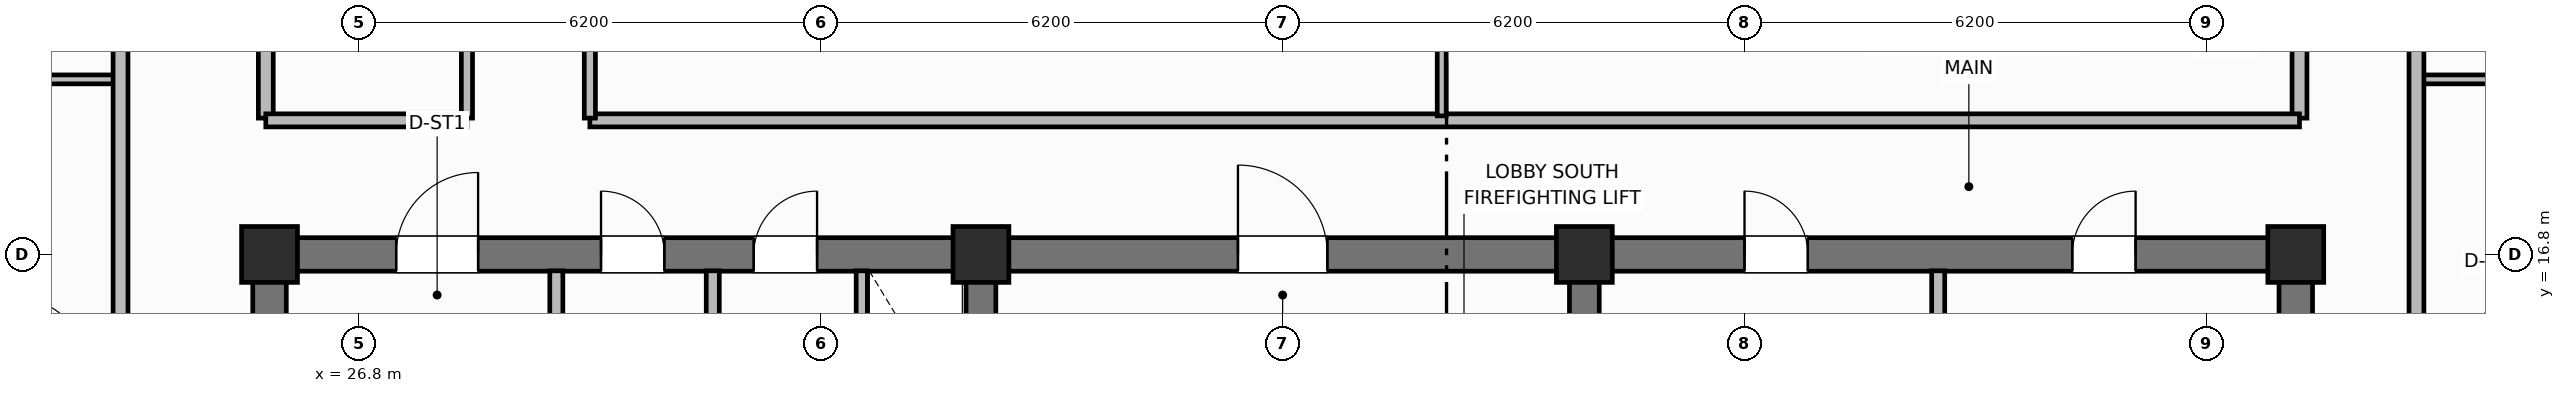
"""IFC4 building model, lengths in metres.
Left out: names, types, materials, properties, quantities, classifications, styles, units other than length and angle.
Written with IfcOpenShell. Run it as: python <this file> out.ifc"""

import sys

from ifc_helpers import new_model, si_unit, direction, frame, frame_2d, origin, origin_2d, place, context, subcontext, project, spatial, rectangle, extrude, element, fill, save


model = new_model("IFC4")
c1 = context("Model", 3, precision=1e-05, world=origin(), true_north=direction((0.0, 1.0)))
c2 = subcontext(c1, "Body", "Model", "MODEL_VIEW")
j1 = project(units=[si_unit("LENGTHUNIT", "METRE"), si_unit("PLANEANGLEUNIT", "RADIAN")], contexts=[c1])
p1 = place(None, origin())
s1 = spatial("IfcSite", under=j1, at=p1, CompositionType="ELEMENT")
p2 = place(p1, origin())
s2 = spatial("IfcBuilding", under=s1, at=p2, CompositionType="ELEMENT")
p3 = place(p2, frame((0.0, 0.0, 293.5)))
s3 = spatial("IfcBuildingStorey", under=s2, at=p3, CompositionType="ELEMENT", Elevation=293.5)
for number, where, z_axis, x_axis in (
    (1, (25.6, 10.825, 0.0), (0.0, 0.0, 1.0), (0.0, 1.0, 0.0)),
    (2, (52.8, 10.825, 0.0), (0.0, 0.0, 1.0), (0.0, 1.0, 0.0)),
):
    element("IfcWall", number, at=place(p3, frame(where, z_axis=z_axis, x_axis=x_axis)), inside=s3, PredefinedType="SHEAR", context=c2, shape_type="SweptSolid", body=[
        extrude(rectangle(XDim=5.75, YDim=0.45, at=frame_2d((2.875, 0.0))), origin(), (0.0, 0.0, 1.0), 3.7),
    ])
p4 = place(p3, frame((25.6, 16.8, 0.0), z_axis=(0.0, 0.0, 1.0), x_axis=(1.0, 0.0, 0.0)))
e3 = element("IfcWall", 3, at=p4, inside=s3, PredefinedType="SHEAR", context=c2, shape_type="SweptSolid", body=[
    extrude(rectangle(XDim=27.2, YDim=0.45, at=frame_2d((13.6, 0.0))), origin(), (0.0, 0.0, 1.0), 3.7),
])
p5 = place(p4, frame((1.7, 0.0, 0.0)))
e4 = element("IfcOpeningElement", 4, at=p5, cuts=e3, PredefinedType="OPENING", context=c2, shape_type="SweptSolid", body=[
    extrude(rectangle(XDim=1.1, YDim=2.15, at=frame_2d((0.55, 1.075))), frame((0.0, 0.235, 0.0), z_axis=(0.0, -1.0, 0.0), x_axis=(1.0, 0.0, 0.0)), (0.0, 0.0, 1.0), 0.47),
])
p6 = place(p4, frame((4.45, 0.0, 0.0)))
e5 = element("IfcOpeningElement", 5, at=p6, cuts=e3, PredefinedType="OPENING", context=c2, shape_type="SweptSolid", body=[
    extrude(rectangle(XDim=0.85, YDim=2.1, at=frame_2d((0.425, 1.05))), frame((0.0, 0.235, 0.0), z_axis=(0.0, -1.0, 0.0), x_axis=(1.0, 0.0, 0.0)), (0.0, 0.0, 1.0), 0.47),
])
p7 = place(p4, frame((6.5, 0.0, 0.0)))
e6 = element("IfcOpeningElement", 6, at=p7, cuts=e3, PredefinedType="OPENING", context=c2, shape_type="SweptSolid", body=[
    extrude(rectangle(XDim=0.85, YDim=2.1, at=frame_2d((0.425, 1.05))), frame((0.0, 0.235, 0.0), z_axis=(0.0, -1.0, 0.0), x_axis=(1.0, 0.0, 0.0)), (0.0, 0.0, 1.0), 0.47),
])
p8 = place(p4, frame((13.0, 0.0, 0.0)))
e7 = element("IfcOpeningElement", 7, at=p8, cuts=e3, PredefinedType="OPENING", context=c2, shape_type="SweptSolid", body=[
    extrude(rectangle(XDim=1.2, YDim=2.15, at=frame_2d((0.6, 1.075))), frame((0.0, 0.235, 0.0), z_axis=(0.0, -1.0, 0.0), x_axis=(1.0, 0.0, 0.0)), (0.0, 0.0, 1.0), 0.47),
])
p9 = place(p4, frame((19.8, 0.0, 0.0)))
e8 = element("IfcOpeningElement", 8, at=p9, cuts=e3, PredefinedType="OPENING", context=c2, shape_type="SweptSolid", body=[
    extrude(rectangle(XDim=0.85, YDim=2.1, at=frame_2d((0.425, 1.05))), frame((0.0, 0.235, 0.0), z_axis=(0.0, -1.0, 0.0), x_axis=(1.0, 0.0, 0.0)), (0.0, 0.0, 1.0), 0.47),
])
p10 = place(p4, frame((24.2, 0.0, 0.0)))
e9 = element("IfcOpeningElement", 9, at=p10, cuts=e3, PredefinedType="OPENING", context=c2, shape_type="SweptSolid", body=[
    extrude(rectangle(XDim=0.85, YDim=2.1, at=frame_2d((0.425, 1.05))), frame((0.0, 0.235, 0.0), z_axis=(0.0, -1.0, 0.0), x_axis=(1.0, 0.0, 0.0)), (0.0, 0.0, 1.0), 0.47),
])
for number, where, z_axis, x_axis in (
    (10, (35.15, 10.825, 0.0), (0.0, 0.0, 1.0), (0.0, 1.0, 0.0)),
    (11, (43.25, 10.825, 0.0), (0.0, 0.0, 1.0), (0.0, 1.0, 0.0)),
):
    element("IfcWall", number, at=place(p3, frame(where, z_axis=z_axis, x_axis=x_axis)), inside=s3, PredefinedType="SHEAR", context=c2, shape_type="SweptSolid", body=[
        extrude(rectangle(XDim=5.75, YDim=0.4, at=frame_2d((2.875, 0.0))), origin(), (0.0, 0.0, 1.0), 3.7),
    ])
for number, where, z_axis, x_axis in (
    (12, (25.6, 16.8, 0.0), (0.0, 0.0, 1.0), (1.0, 0.0, 0.0)),
    (13, (35.15, 16.8, 0.0), (0.0, 0.0, 1.0), (1.0, 0.0, 0.0)),
    (14, (43.25, 16.8, 0.0), (0.0, 0.0, 1.0), (1.0, 0.0, 0.0)),
    (15, (52.8, 16.8, 0.0), (0.0, 0.0, 1.0), (1.0, 0.0, 0.0)),
):
    element("IfcColumn", number, at=place(p3, frame(where, z_axis=z_axis, x_axis=x_axis)), inside=s3, PredefinedType="COLUMN", context=c2, shape_type="SweptSolid", body=[
        extrude(rectangle(XDim=0.75, YDim=0.75, at=origin_2d()), origin(), (0.0, 0.0, 1.0), 3.7),
    ])
for number, where, z_axis, x_axis in (
    (16, (29.45, 14.5, 0.0), (0.0, 0.0, 1.0), (0.0, 1.0, 0.0)),
    (17, (31.55, 14.5, 0.0), (0.0, 0.0, 1.0), (0.0, 1.0, 0.0)),
):
    element("IfcWall", number, at=place(p3, frame(where, z_axis=z_axis, x_axis=x_axis)), inside=s3, PredefinedType="PARTITIONING", context=c2, shape_type="SweptSolid", body=[
        extrude(rectangle(XDim=2.08, YDim=0.175, at=frame_2d((1.04, 0.0))), origin(), (0.0, 0.0, 1.0), 2.54),
    ])
p11 = place(p3, frame((33.55, 14.5, 0.0), z_axis=(0.0, 0.0, 1.0), x_axis=(0.0, 1.0, 0.0)))
e18 = element("IfcWall", 18, at=p11, inside=s3, PredefinedType="PARTITIONING", context=c2, shape_type="SweptSolid", body=[
    extrude(rectangle(XDim=2.08, YDim=0.15, at=frame_2d((1.04, 0.0))), origin(), (0.0, 0.0, 1.0), 2.54),
])
p12 = place(p11, frame((0.55, 0.0, 0.0)))
e19 = element("IfcOpeningElement", 19, at=p12, cuts=e18, PredefinedType="OPENING", context=c2, shape_type="SweptSolid", body=[
    extrude(rectangle(XDim=0.85, YDim=2.05, at=frame_2d((0.425, 1.025))), frame((0.0, 0.085, 0.0), z_axis=(0.0, -1.0, 0.0), x_axis=(1.0, 0.0, 0.0)), (0.0, 0.0, 1.0), 0.17),
])
p13 = place(p3, frame((48.0, 10.95, 0.0), z_axis=(0.0, 0.0, 1.0), x_axis=(0.0, 1.0, 0.0)))
e20 = element("IfcWall", 20, at=p13, inside=s3, PredefinedType="PARTITIONING", context=c2, shape_type="SweptSolid", body=[
    extrude(rectangle(XDim=5.63, YDim=0.175, at=frame_2d((2.815, 0.0))), origin(), (0.0, 0.0, 1.0), 2.54),
])
for number, where, z_axis, x_axis in (
    (21, (25.55, 18.63, 0.0), (0.0, 0.0, 1.0), (0.0, 1.0, 0.0)),
    (22, (52.85, 18.63, 0.0), (0.0, 0.0, 1.0), (0.0, 1.0, 0.0)),
):
    element("IfcWall", number, at=place(p3, frame(where, z_axis=z_axis, x_axis=x_axis)), inside=s3, PredefinedType="PARTITIONING", context=c2, shape_type="SweptSolid", body=[
        extrude(rectangle(XDim=19.14, YDim=0.2, at=frame_2d((9.57, 0.0))), origin(), (0.0, 0.0, 1.0), 2.54),
    ])
p14 = place(p3, frame((25.55, 18.6, 0.0), z_axis=(0.0, 0.0, 1.0), x_axis=(1.0, 0.0, 0.0)))
e23 = element("IfcWall", 23, at=p14, inside=s3, PredefinedType="PARTITIONING", context=c2, shape_type="SweptSolid", body=[
    extrude(rectangle(XDim=2.7, YDim=0.175, at=frame_2d((1.35, 0.0))), origin(), (0.0, 0.0, 1.0), 2.54),
])
p15 = place(p3, frame((29.9, 18.6, 0.0), z_axis=(0.0, 0.0, 1.0), x_axis=(1.0, 0.0, 0.0)))
e24 = element("IfcWall", 24, at=p15, inside=s3, PredefinedType="PARTITIONING", context=c2, shape_type="SweptSolid", body=[
    extrude(rectangle(XDim=22.95, YDim=0.175, at=frame_2d((11.475, 0.0))), origin(), (0.0, 0.0, 1.0), 2.54),
])
p16 = place(p3, frame((41.335, 18.66, 0.0), z_axis=(0.0, 0.0, 1.0), x_axis=(0.0, 1.0, 0.0)))
e25 = element("IfcWall", 25, at=p16, inside=s3, PredefinedType="PARTITIONING", context=c2, shape_type="SweptSolid", body=[
    extrude(rectangle(XDim=6.821, YDim=0.12, at=frame_2d((3.41, 0.0))), origin(), (0.0, 0.0, 1.0), 2.54),
])
p17 = place(p16, frame((2.0, 0.0, 0.0)))
e26 = element("IfcOpeningElement", 26, at=p17, cuts=e25, PredefinedType="OPENING", context=c2, shape_type="SweptSolid", body=[
    extrude(rectangle(XDim=0.9, YDim=2.1, at=frame_2d((0.45, 1.05))), frame((0.0, 0.07, 0.0), z_axis=(0.0, -1.0, 0.0), x_axis=(1.0, 0.0, 0.0)), (0.0, 0.0, 1.0), 0.14),
])
p18 = place(p3, frame((28.25, 18.63, 0.0), z_axis=(0.0, 0.0, 1.0), x_axis=(0.0, 1.0, 0.0)))
e27 = element("IfcWall", 27, at=p18, inside=s3, PredefinedType="PARTITIONING", context=c2, shape_type="SweptSolid", body=[
    extrude(rectangle(XDim=19.14, YDim=0.15, at=frame_2d((9.57, 0.0))), origin(), (0.0, 0.0, 1.0), 2.54),
])
p19 = place(p18, frame((3.0, 0.0, 0.0)))
e28 = element("IfcOpeningElement", 28, at=p19, cuts=e27, PredefinedType="OPENING", context=c2, shape_type="SweptSolid", body=[
    extrude(rectangle(XDim=0.9, YDim=2.1, at=frame_2d((0.45, 1.05))), frame((0.0, 0.085, 0.0), z_axis=(0.0, -1.0, 0.0), x_axis=(1.0, 0.0, 0.0)), (0.0, 0.0, 1.0), 0.17),
])
p20 = place(p18, frame((11.5, 0.0, 0.0)))
e29 = element("IfcOpeningElement", 29, at=p20, cuts=e27, PredefinedType="OPENING", context=c2, shape_type="SweptSolid", body=[
    extrude(rectangle(XDim=0.9, YDim=2.1, at=frame_2d((0.45, 1.05))), frame((0.0, 0.085, 0.0), z_axis=(0.0, -1.0, 0.0), x_axis=(1.0, 0.0, 0.0)), (0.0, 0.0, 1.0), 0.17),
])
p21 = place(p3, frame((29.9, 18.63, 0.0), z_axis=(0.0, 0.0, 1.0), x_axis=(0.0, 1.0, 0.0)))
e30 = element("IfcWall", 30, at=p21, inside=s3, PredefinedType="PARTITIONING", context=c2, shape_type="SweptSolid", body=[
    extrude(rectangle(XDim=19.14, YDim=0.15, at=frame_2d((9.57, 0.0))), origin(), (0.0, 0.0, 1.0), 2.54),
])
p22 = place(p21, frame((2.2, 0.0, 0.0)))
e31 = element("IfcOpeningElement", 31, at=p22, cuts=e30, PredefinedType="OPENING", context=c2, shape_type="SweptSolid", body=[
    extrude(rectangle(XDim=1.0, YDim=2.15, at=frame_2d((0.5, 1.075))), frame((0.0, 0.085, 0.0), z_axis=(0.0, -1.0, 0.0), x_axis=(1.0, 0.0, 0.0)), (0.0, 0.0, 1.0), 0.17),
])
p23 = place(p21, frame((8.89, 0.0, 0.0)))
e32 = element("IfcOpeningElement", 32, at=p23, cuts=e30, PredefinedType="OPENING", context=c2, shape_type="SweptSolid", body=[
    extrude(rectangle(XDim=1.0, YDim=2.15, at=frame_2d((0.5, 1.075))), frame((0.0, 0.085, 0.0), z_axis=(0.0, -1.0, 0.0), x_axis=(1.0, 0.0, 0.0)), (0.0, 0.0, 1.0), 0.17),
])
p24 = place(p3, frame((21.65, 19.15, 0.0), z_axis=(0.0, 0.0, 1.0), x_axis=(1.0, 0.0, 0.0)))
e33 = element("IfcWall", 33, at=p24, inside=s3, PredefinedType="PARTITIONING", context=c2, shape_type="SweptSolid", body=[
    extrude(rectangle(XDim=1.95, YDim=0.12, at=frame_2d((0.975, 0.0))), origin(), (0.0, 0.0, 1.0), 2.54),
])
p25 = place(p3, frame((23.6, 9.95, 0.0), z_axis=(0.0, 0.0, 1.0), x_axis=(0.0, 1.0, 0.0)))
e34 = element("IfcWall", 34, at=p25, inside=s3, PredefinedType="PARTITIONING", context=c2, shape_type="SweptSolid", body=[
    extrude(rectangle(XDim=36.5, YDim=0.2, at=frame_2d((18.25, 0.0))), origin(), (0.0, 0.0, 1.0), 2.54),
])
p26 = place(p25, frame((3.25, 0.0, 0.0)))
e35 = element("IfcOpeningElement", 35, at=p26, cuts=e34, PredefinedType="OPENING", context=c2, shape_type="SweptSolid", body=[
    extrude(rectangle(XDim=1.0, YDim=2.15, at=frame_2d((0.5, 1.075))), frame((0.0, 0.11, 0.0), z_axis=(0.0, -1.0, 0.0), x_axis=(1.0, 0.0, 0.0)), (0.0, 0.0, 1.0), 0.22),
])
p27 = place(p25, frame((23.5, 0.0, 0.0)))
e36 = element("IfcOpeningElement", 36, at=p27, cuts=e34, PredefinedType="OPENING", context=c2, shape_type="SweptSolid", body=[
    extrude(rectangle(XDim=1.0, YDim=2.15, at=frame_2d((0.5, 1.075))), frame((0.0, 0.11, 0.0), z_axis=(0.0, -1.0, 0.0), x_axis=(1.0, 0.0, 0.0)), (0.0, 0.0, 1.0), 0.22),
])
p28 = place(p3, frame((54.42, 19.15, 0.0), z_axis=(0.0, 0.0, 1.0), x_axis=(1.0, 0.0, 0.0)))
e37 = element("IfcWall", 37, at=p28, inside=s3, PredefinedType="PARTITIONING", context=c2, shape_type="SweptSolid", body=[
    extrude(rectangle(XDim=1.95, YDim=0.12, at=frame_2d((0.975, 0.0))), origin(), (0.0, 0.0, 1.0), 2.54),
])
p29 = place(p3, frame((54.42, 9.95, 0.0), z_axis=(0.0, 0.0, 1.0), x_axis=(0.0, 1.0, 0.0)))
e38 = element("IfcWall", 38, at=p29, inside=s3, PredefinedType="PARTITIONING", context=c2, shape_type="SweptSolid", body=[
    extrude(rectangle(XDim=36.5, YDim=0.2, at=frame_2d((18.25, 0.0))), origin(), (0.0, 0.0, 1.0), 2.54),
])
p30 = place(p29, frame((3.25, 0.0, 0.0)))
e39 = element("IfcOpeningElement", 39, at=p30, cuts=e38, PredefinedType="OPENING", context=c2, shape_type="SweptSolid", body=[
    extrude(rectangle(XDim=1.0, YDim=2.15, at=frame_2d((0.5, 1.075))), frame((0.0, 0.11, 0.0), z_axis=(0.0, -1.0, 0.0), x_axis=(1.0, 0.0, 0.0)), (0.0, 0.0, 1.0), 0.22),
])
p31 = place(p29, frame((14.25, 0.0, 0.0)))
e40 = element("IfcOpeningElement", 40, at=p31, cuts=e38, PredefinedType="OPENING", context=c2, shape_type="SweptSolid", body=[
    extrude(rectangle(XDim=1.0, YDim=2.15, at=frame_2d((0.5, 1.075))), frame((0.0, 0.11, 0.0), z_axis=(0.0, -1.0, 0.0), x_axis=(1.0, 0.0, 0.0)), (0.0, 0.0, 1.0), 0.22),
])
p32 = place(p5, origin())
e41 = element("IfcDoor", 41, at=p32, inside=s3, OperationType="SINGLE_SWING_RIGHT", PredefinedType="DOOR", context=c2, shape_type="SweptSolid", body=[
    extrude(rectangle(XDim=1.1, YDim=2.15, at=frame_2d((0.55, 1.075))), frame((0.0, 0.025, 0.0), z_axis=(0.0, -1.0, 0.0), x_axis=(1.0, 0.0, 0.0)), (0.0, 0.0, 1.0), 0.05),
])
fill(e4, e41)
p33 = place(p6, origin())
e42 = element("IfcDoor", 42, at=p33, inside=s3, OperationType="SINGLE_SWING_LEFT", PredefinedType="DOOR", context=c2, shape_type="SweptSolid", body=[
    extrude(rectangle(XDim=0.85, YDim=2.1, at=frame_2d((0.425, 1.05))), frame((0.0, 0.025, 0.0), z_axis=(0.0, -1.0, 0.0), x_axis=(1.0, 0.0, 0.0)), (0.0, 0.0, 1.0), 0.05),
])
fill(e5, e42)
p34 = place(p7, origin())
e43 = element("IfcDoor", 43, at=p34, inside=s3, OperationType="SINGLE_SWING_RIGHT", PredefinedType="DOOR", context=c2, shape_type="SweptSolid", body=[
    extrude(rectangle(XDim=0.85, YDim=2.1, at=frame_2d((0.425, 1.05))), frame((0.0, 0.025, 0.0), z_axis=(0.0, -1.0, 0.0), x_axis=(1.0, 0.0, 0.0)), (0.0, 0.0, 1.0), 0.05),
])
fill(e6, e43)
p35 = place(p8, origin())
e44 = element("IfcDoor", 44, at=p35, inside=s3, OperationType="SINGLE_SWING_LEFT", PredefinedType="DOOR", context=c2, shape_type="SweptSolid", body=[
    extrude(rectangle(XDim=1.2, YDim=2.15, at=frame_2d((0.6, 1.075))), frame((0.0, 0.025, 0.0), z_axis=(0.0, -1.0, 0.0), x_axis=(1.0, 0.0, 0.0)), (0.0, 0.0, 1.0), 0.05),
])
fill(e7, e44)
p36 = place(p9, origin())
e45 = element("IfcDoor", 45, at=p36, inside=s3, OperationType="SINGLE_SWING_LEFT", PredefinedType="DOOR", context=c2, shape_type="SweptSolid", body=[
    extrude(rectangle(XDim=0.85, YDim=2.1, at=frame_2d((0.425, 1.05))), frame((0.0, 0.025, 0.0), z_axis=(0.0, -1.0, 0.0), x_axis=(1.0, 0.0, 0.0)), (0.0, 0.0, 1.0), 0.05),
])
fill(e8, e45)
p37 = place(p10, origin())
e46 = element("IfcDoor", 46, at=p37, inside=s3, OperationType="SINGLE_SWING_RIGHT", PredefinedType="DOOR", context=c2, shape_type="SweptSolid", body=[
    extrude(rectangle(XDim=0.85, YDim=2.1, at=frame_2d((0.425, 1.05))), frame((0.0, 0.025, 0.0), z_axis=(0.0, -1.0, 0.0), x_axis=(1.0, 0.0, 0.0)), (0.0, 0.0, 1.0), 0.05),
])
fill(e9, e46)
save(model, sys.argv[1])
